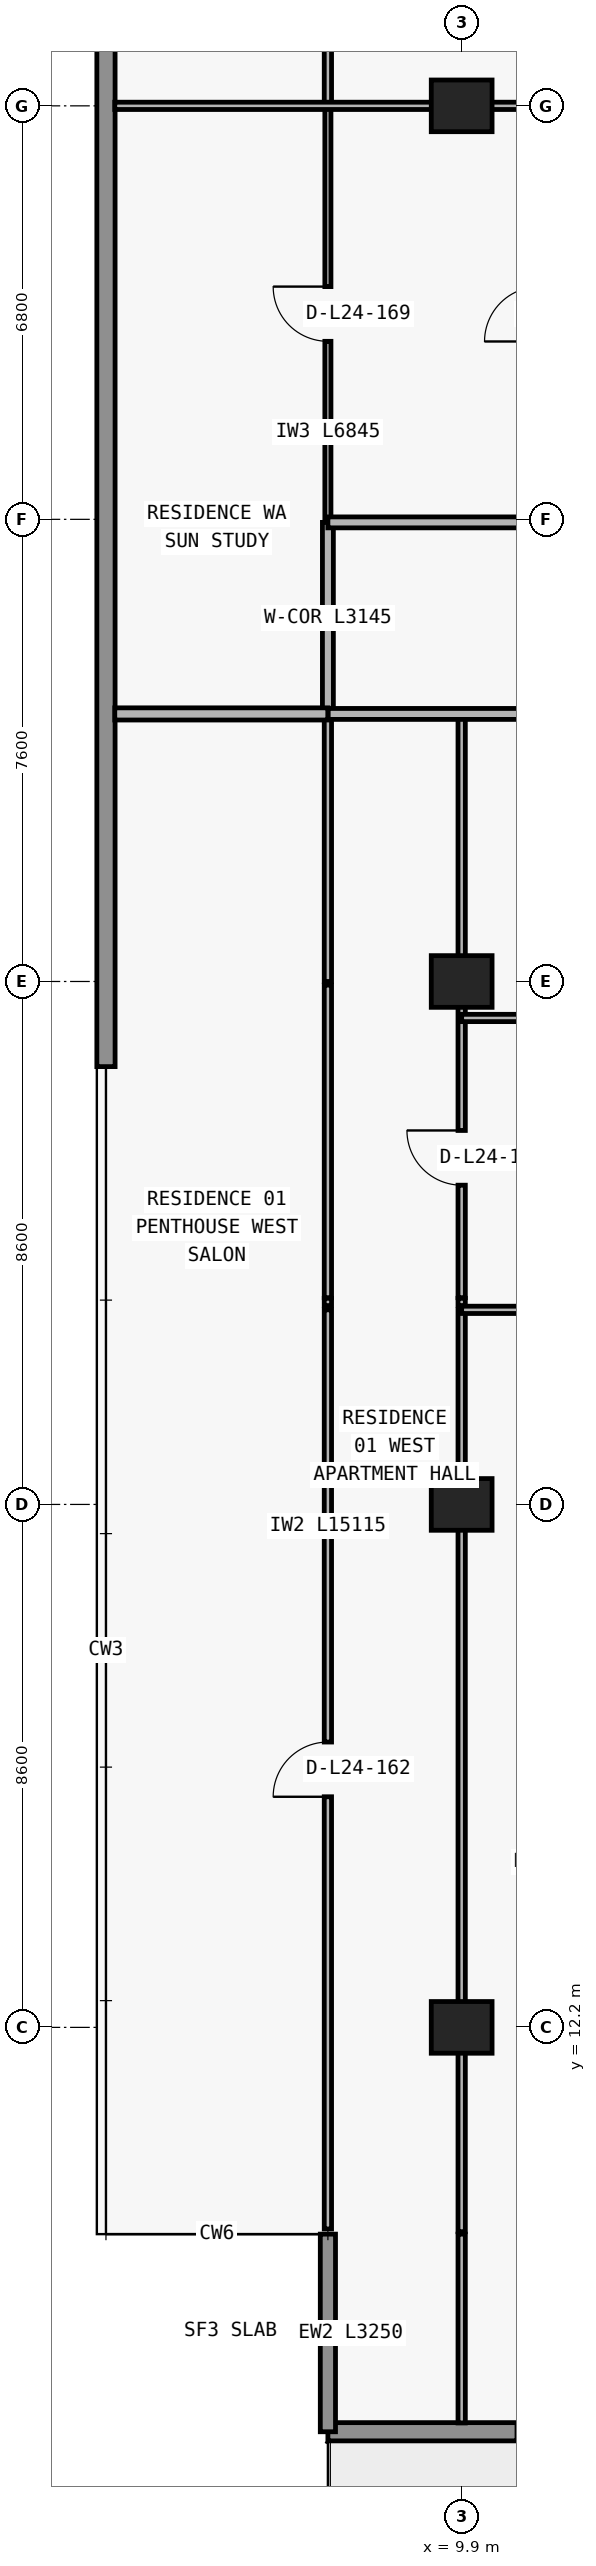
"""IFC4 building model, lengths in metres.
Left out: names, types, materials, properties, quantities, classifications, styles, units other than length and angle.
Written with IfcOpenShell. Run it as: python <this file> out.ifc"""

import sys

from ifc_helpers import new_model, si_unit, direction, frame, frame_2d, origin, origin_2d, place, context, subcontext, project, spatial, rectangle, extrude, element, fill, save


model = new_model("IFC4")
c1 = context("Model", 3, precision=1e-05, world=origin(), true_north=direction((0.0, 1.0)))
c2 = subcontext(c1, "Body", "Model", "MODEL_VIEW")
j1 = project(units=[si_unit("LENGTHUNIT", "METRE"), si_unit("PLANEANGLEUNIT", "RADIAN")], contexts=[c1])
p1 = place(None, origin())
s1 = spatial("IfcSite", under=j1, at=p1, CompositionType="ELEMENT")
p2 = place(p1, origin())
s2 = spatial("IfcBuilding", under=s1, at=p2, CompositionType="ELEMENT")
p3 = place(p2, frame((0.0, 0.0, 91.2)))
s3 = spatial("IfcBuildingStorey", under=s2, at=p3, CompositionType="ELEMENT", Elevation=91.2)
for number, where, z_axis, x_axis in (
    (1, (9.9, 12.2, 0.0), (0.0, 0.0, 1.0), (1.0, 0.0, 0.0)),
    (2, (9.9, 20.8, 0.0), (0.0, 0.0, 1.0), (1.0, 0.0, 0.0)),
    (3, (9.9, 29.4, 0.0), (0.0, 0.0, 1.0), (1.0, 0.0, 0.0)),
    (4, (9.9, 43.8, 0.0), (0.0, 0.0, 1.0), (1.0, 0.0, 0.0)),
):
    element("IfcColumn", number, at=place(p3, frame(where, z_axis=z_axis, x_axis=x_axis)), inside=s3, PredefinedType="COLUMN", context=c2, shape_type="SweptSolid", body=[
        extrude(rectangle(XDim=1.0, YDim=0.85, at=origin_2d()), origin(), (0.0, 0.0, 1.0), 3.05),
    ])
p4 = place(p3, frame((70.1, 5.55, 0.0), z_axis=(0.0, 0.0, 1.0), x_axis=(-1.0, 0.0, 0.0)))
e5 = element("IfcWall", 5, at=p4, inside=s3, PredefinedType="STANDARD", context=c2, shape_type="SweptSolid", body=[
    extrude(rectangle(XDim=62.4, YDim=0.3, at=frame_2d((31.2, 0.0))), origin(), (0.0, 0.0, 1.0), 3.05),
])
p5 = place(p4, frame((57.29, 0.0, 0.0)))
e6 = element("IfcOpeningElement", 6, at=p5, cuts=e5, PredefinedType="OPENING", context=c2, shape_type="SweptSolid", body=[
    extrude(rectangle(XDim=2.0, YDim=2.3, at=frame_2d((1.0, 1.15))), frame((0.0, 0.16, 0.0), z_axis=(0.0, -1.0, 0.0), x_axis=(1.0, 0.0, 0.0)), (0.0, 0.0, 1.0), 0.32),
])
p6 = place(p4, frame((52.61, 0.0, 0.65)))
e7 = element("IfcOpeningElement", 7, at=p6, cuts=e5, PredefinedType="OPENING", context=c2, shape_type="SweptSolid", body=[
    extrude(rectangle(XDim=2.6, YDim=1.85, at=frame_2d((1.3, 0.925))), frame((0.0, 0.16, 0.0), z_axis=(0.0, -1.0, 0.0), x_axis=(1.0, 0.0, 0.0)), (0.0, 0.0, 1.0), 0.32),
])
p7 = place(p4, frame((46.5, 0.0, 0.85)))
e8 = element("IfcOpeningElement", 8, at=p7, cuts=e5, PredefinedType="OPENING", context=c2, shape_type="SweptSolid", body=[
    extrude(rectangle(XDim=2.2, YDim=1.55, at=frame_2d((1.1, 0.775))), frame((0.0, 0.16, 0.0), z_axis=(0.0, -1.0, 0.0), x_axis=(1.0, 0.0, 0.0)), (0.0, 0.0, 1.0), 0.32),
])
p8 = place(p4, frame((40.09, 0.0, 0.0)))
e9 = element("IfcOpeningElement", 9, at=p8, cuts=e5, PredefinedType="OPENING", context=c2, shape_type="SweptSolid", body=[
    extrude(rectangle(XDim=2.0, YDim=2.3, at=frame_2d((1.0, 1.15))), frame((0.0, 0.16, 0.0), z_axis=(0.0, -1.0, 0.0), x_axis=(1.0, 0.0, 0.0)), (0.0, 0.0, 1.0), 0.32),
])
p9 = place(p4, frame((35.99, 0.0, 0.85)))
e10 = element("IfcOpeningElement", 10, at=p9, cuts=e5, PredefinedType="OPENING", context=c2, shape_type="SweptSolid", body=[
    extrude(rectangle(XDim=1.8, YDim=1.55, at=frame_2d((0.9, 0.775))), frame((0.0, 0.16, 0.0), z_axis=(0.0, -1.0, 0.0), x_axis=(1.0, 0.0, 0.0)), (0.0, 0.0, 1.0), 0.32),
])
p10 = place(p4, frame((28.314, 0.0, 0.85)))
e11 = element("IfcOpeningElement", 11, at=p10, cuts=e5, PredefinedType="OPENING", context=c2, shape_type="SweptSolid", body=[
    extrude(rectangle(XDim=2.2, YDim=1.55, at=frame_2d((1.1, 0.775))), frame((0.0, 0.16, 0.0), z_axis=(0.0, -1.0, 0.0), x_axis=(1.0, 0.0, 0.0)), (0.0, 0.0, 1.0), 0.32),
])
p11 = place(p4, frame((24.09, 0.0, 0.0)))
e12 = element("IfcOpeningElement", 12, at=p11, cuts=e5, PredefinedType="OPENING", context=c2, shape_type="SweptSolid", body=[
    extrude(rectangle(XDim=2.0, YDim=2.3, at=frame_2d((1.0, 1.15))), frame((0.0, 0.16, 0.0), z_axis=(0.0, -1.0, 0.0), x_axis=(1.0, 0.0, 0.0)), (0.0, 0.0, 1.0), 0.32),
])
p12 = place(p4, frame((19.99, 0.0, 0.85)))
e13 = element("IfcOpeningElement", 13, at=p12, cuts=e5, PredefinedType="OPENING", context=c2, shape_type="SweptSolid", body=[
    extrude(rectangle(XDim=1.8, YDim=1.55, at=frame_2d((0.9, 0.775))), frame((0.0, 0.16, 0.0), z_axis=(0.0, -1.0, 0.0), x_axis=(1.0, 0.0, 0.0)), (0.0, 0.0, 1.0), 0.32),
])
p13 = place(p4, frame((16.09, 0.0, 0.0)))
e14 = element("IfcOpeningElement", 14, at=p13, cuts=e5, PredefinedType="OPENING", context=c2, shape_type="SweptSolid", body=[
    extrude(rectangle(XDim=2.0, YDim=2.3, at=frame_2d((1.0, 1.15))), frame((0.0, 0.16, 0.0), z_axis=(0.0, -1.0, 0.0), x_axis=(1.0, 0.0, 0.0)), (0.0, 0.0, 1.0), 0.32),
])
p14 = place(p4, frame((11.41, 0.0, 0.65)))
e15 = element("IfcOpeningElement", 15, at=p14, cuts=e5, PredefinedType="OPENING", context=c2, shape_type="SweptSolid", body=[
    extrude(rectangle(XDim=2.6, YDim=1.85, at=frame_2d((1.3, 0.925))), frame((0.0, 0.16, 0.0), z_axis=(0.0, -1.0, 0.0), x_axis=(1.0, 0.0, 0.0)), (0.0, 0.0, 1.0), 0.32),
])
p15 = place(p4, frame((5.3, 0.0, 0.85)))
e16 = element("IfcOpeningElement", 16, at=p15, cuts=e5, PredefinedType="OPENING", context=c2, shape_type="SweptSolid", body=[
    extrude(rectangle(XDim=2.2, YDim=1.55, at=frame_2d((1.1, 0.775))), frame((0.0, 0.16, 0.0), z_axis=(0.0, -1.0, 0.0), x_axis=(1.0, 0.0, 0.0)), (0.0, 0.0, 1.0), 0.32),
])
p16 = place(p3, frame((7.7, 8.8, 0.0), z_axis=(0.0, 0.0, 1.0), x_axis=(0.0, -1.0, 0.0)))
e17 = element("IfcWall", 17, at=p16, inside=s3, PredefinedType="ELEMENTEDWALL", context=c2, shape_type="SweptSolid", body=[
    extrude(rectangle(XDim=3.25, YDim=0.25, at=frame_2d((1.625, 0.0))), origin(), (0.0, 0.0, 1.0), 3.05),
])
p17 = place(p3, frame((4.05, 28.0, 0.0), z_axis=(0.0, 0.0, 1.0), x_axis=(0.0, 1.0, 0.0)))
e18 = element("IfcWall", 18, at=p17, inside=s3, PredefinedType="STANDARD", context=c2, shape_type="SweptSolid", body=[
    extrude(rectangle(XDim=19.2, YDim=0.3, at=frame_2d((9.6, 0.0))), origin(), (0.0, 0.0, 1.0), 3.05),
])
p18 = place(p3, frame((7.7, 8.885, 0.0), z_axis=(0.0, 0.0, 1.0), x_axis=(0.0, 1.0, 0.0)))
e19 = element("IfcWall", 19, at=p18, inside=s3, PredefinedType="PARTITIONING", context=c2, shape_type="SweptSolid", body=[
    extrude(rectangle(XDim=15.115, YDim=0.12, at=frame_2d((7.558, 0.0))), origin(), (0.0, 0.0, 1.0), 3.05),
])
p19 = place(p18, frame((7.107, 0.0, 0.0)))
e20 = element("IfcOpeningElement", 20, at=p19, cuts=e19, PredefinedType="OPENING", context=c2, shape_type="SweptSolid", body=[
    extrude(rectangle(XDim=0.9, YDim=2.15, at=frame_2d((0.45, 1.075))), frame((0.0, 0.07, 0.0), z_axis=(0.0, -1.0, 0.0), x_axis=(1.0, 0.0, 0.0)), (0.0, 0.0, 1.0), 0.14),
])
p20 = place(p3, frame((7.7, 24.07, 0.0), z_axis=(0.0, 0.0, 1.0), x_axis=(0.0, 1.0, 0.0)))
e21 = element("IfcWall", 21, at=p20, inside=s3, PredefinedType="PARTITIONING", context=c2, shape_type="SweptSolid", body=[
    extrude(rectangle(XDim=0.12, YDim=0.12, at=frame_2d((0.06, 0.0))), origin(), (0.0, 0.0, 1.0), 3.05),
])
p21 = place(p3, frame((7.7, 24.2, 0.0), z_axis=(0.0, 0.0, 1.0), x_axis=(0.0, 1.0, 0.0)))
e22 = element("IfcWall", 22, at=p21, inside=s3, PredefinedType="PARTITIONING", context=c2, shape_type="SweptSolid", body=[
    extrude(rectangle(XDim=5.14, YDim=0.12, at=frame_2d((2.57, 0.0))), origin(), (0.0, 0.0, 1.0), 3.05),
])
p22 = place(p3, frame((7.7, 29.4, 0.0), z_axis=(0.0, 0.0, 1.0), x_axis=(0.0, 1.0, 0.0)))
e23 = element("IfcWall", 23, at=p22, inside=s3, PredefinedType="PARTITIONING", context=c2, shape_type="SweptSolid", body=[
    extrude(rectangle(XDim=4.4, YDim=0.12, at=frame_2d((2.2, 0.0))), origin(), (0.0, 0.0, 1.0), 3.05),
])
p23 = place(p3, frame((7.7, 33.805, 0.0), z_axis=(0.0, 0.0, 1.0), x_axis=(0.0, 1.0, 0.0)))
e24 = element("IfcWall", 24, at=p23, inside=s3, PredefinedType="PARTITIONING", context=c2, shape_type="SweptSolid", body=[
    extrude(rectangle(XDim=3.145, YDim=0.18, at=frame_2d((1.573, 0.0))), origin(), (0.0, 0.0, 1.0), 3.05),
])
p24 = place(p3, frame((7.7, 36.955, 0.0), z_axis=(0.0, 0.0, 1.0), x_axis=(0.0, 1.0, 0.0)))
e25 = element("IfcWall", 25, at=p24, inside=s3, PredefinedType="MOVABLE", context=c2, shape_type="SweptSolid", body=[
    extrude(rectangle(XDim=6.845, YDim=0.1, at=frame_2d((3.422, 0.0))), origin(), (0.0, 0.0, 1.0), 3.05),
])
p25 = place(p24, frame((2.972, 0.0, 0.0)))
e26 = element("IfcOpeningElement", 26, at=p25, cuts=e25, PredefinedType="OPENING", context=c2, shape_type="SweptSolid", body=[
    extrude(rectangle(XDim=0.9, YDim=2.15, at=frame_2d((0.45, 1.075))), frame((0.0, 0.06, 0.0), z_axis=(0.0, -1.0, 0.0), x_axis=(1.0, 0.0, 0.0)), (0.0, 0.0, 1.0), 0.12),
])
p26 = place(p3, frame((7.7, 43.805, 0.0), z_axis=(0.0, 0.0, 1.0), x_axis=(0.0, 1.0, 0.0)))
e27 = element("IfcWall", 27, at=p26, inside=s3, PredefinedType="PARTITIONING", context=c2, shape_type="SweptSolid", body=[
    extrude(rectangle(XDim=3.275, YDim=0.12, at=frame_2d((1.638, 0.0))), origin(), (0.0, 0.0, 1.0), 3.05),
])
p27 = place(p26, frame((1.188, 0.0, 0.0)))
e28 = element("IfcOpeningElement", 28, at=p27, cuts=e27, PredefinedType="OPENING", context=c2, shape_type="SweptSolid", body=[
    extrude(rectangle(XDim=0.9, YDim=2.15, at=frame_2d((0.45, 1.075))), frame((0.0, 0.07, 0.0), z_axis=(0.0, -1.0, 0.0), x_axis=(1.0, 0.0, 0.0)), (0.0, 0.0, 1.0), 0.14),
])
p28 = place(p3, frame((9.9, 5.695, 0.0), z_axis=(0.0, 0.0, 1.0), x_axis=(0.0, 1.0, 0.0)))
e29 = element("IfcWall", 29, at=p28, inside=s3, PredefinedType="PARTITIONING", context=c2, shape_type="SweptSolid", body=[
    extrude(rectangle(XDim=3.105, YDim=0.12, at=frame_2d((1.552, 0.0))), origin(), (0.0, 0.0, 1.0), 3.05),
])
p29 = place(p3, frame((9.9, 8.84, 0.0), z_axis=(0.0, 0.0, 1.0), x_axis=(0.0, 1.0, 0.0)))
e30 = element("IfcWall", 30, at=p29, inside=s3, PredefinedType="PARTITIONING", context=c2, shape_type="SweptSolid", body=[
    extrude(rectangle(XDim=15.16, YDim=0.12, at=frame_2d((7.58, 0.0))), origin(), (0.0, 0.0, 1.0), 2.174),
])
p30 = place(p3, frame((9.9, 24.07, 0.0), z_axis=(0.0, 0.0, 1.0), x_axis=(0.0, 1.0, 0.0)))
e31 = element("IfcWall", 31, at=p30, inside=s3, PredefinedType="PARTITIONING", context=c2, shape_type="SweptSolid", body=[
    extrude(rectangle(XDim=0.12, YDim=0.12, at=frame_2d((0.06, 0.0))), origin(), (0.0, 0.0, 1.0), 2.174),
])
p31 = place(p3, frame((9.9, 24.2, 0.0), z_axis=(0.0, 0.0, 1.0), x_axis=(0.0, 1.0, 0.0)))
e32 = element("IfcWall", 32, at=p31, inside=s3, PredefinedType="PARTITIONING", context=c2, shape_type="SweptSolid", body=[
    extrude(rectangle(XDim=5.14, YDim=0.12, at=frame_2d((2.57, 0.0))), origin(), (0.0, 0.0, 1.0), 2.174),
])
p32 = place(p31, frame((1.85, 0.0, 0.0)))
e33 = element("IfcOpeningElement", 33, at=p32, cuts=e32, PredefinedType="OPENING", context=c2, shape_type="SweptSolid", body=[
    extrude(rectangle(XDim=0.9, YDim=2.124, at=frame_2d((0.45, 1.062))), frame((0.0, 0.07, 0.0), z_axis=(0.0, -1.0, 0.0), x_axis=(1.0, 0.0, 0.0)), (0.0, 0.0, 1.0), 0.14),
])
p33 = place(p3, frame((9.9, 29.4, 0.0), z_axis=(0.0, 0.0, 1.0), x_axis=(0.0, 1.0, 0.0)))
e34 = element("IfcWall", 34, at=p33, inside=s3, PredefinedType="PARTITIONING", context=c2, shape_type="SweptSolid", body=[
    extrude(rectangle(XDim=4.4, YDim=0.12, at=frame_2d((2.2, 0.0))), origin(), (0.0, 0.0, 1.0), 2.174),
])
p34 = place(p3, frame((9.9, 24.0, 0.0), z_axis=(0.0, 0.0, 1.0), x_axis=(1.0, 0.0, 0.0)))
e35 = element("IfcWall", 35, at=p34, inside=s3, PredefinedType="PARTITIONING", context=c2, shape_type="SweptSolid", body=[
    extrude(rectangle(XDim=8.35, YDim=0.12, at=frame_2d((4.175, 0.0))), origin(), (0.0, 0.0, 1.0), 3.05),
])
p35 = place(p34, frame((1.44, 0.0, 0.0)))
e36 = element("IfcOpeningElement", 36, at=p35, cuts=e35, PredefinedType="OPENING", context=c2, shape_type="SweptSolid", body=[
    extrude(rectangle(XDim=0.9, YDim=2.15, at=frame_2d((0.45, 1.075))), frame((0.0, 0.07, 0.0), z_axis=(0.0, -1.0, 0.0), x_axis=(1.0, 0.0, 0.0)), (0.0, 0.0, 1.0), 0.14),
])
p36 = place(p3, frame((9.9, 28.8, 0.0), z_axis=(0.0, 0.0, 1.0), x_axis=(1.0, 0.0, 0.0)))
e37 = element("IfcWall", 37, at=p36, inside=s3, PredefinedType="PARTITIONING", context=c2, shape_type="SweptSolid", body=[
    extrude(rectangle(XDim=8.35, YDim=0.12, at=frame_2d((4.175, 0.0))), origin(), (0.0, 0.0, 1.0), 3.05),
])
p37 = place(p36, frame((1.44, 0.0, 0.0)))
e38 = element("IfcOpeningElement", 38, at=p37, cuts=e37, PredefinedType="OPENING", context=c2, shape_type="SweptSolid", body=[
    extrude(rectangle(XDim=0.9, YDim=2.15, at=frame_2d((0.45, 1.075))), frame((0.0, 0.07, 0.0), z_axis=(0.0, -1.0, 0.0), x_axis=(1.0, 0.0, 0.0)), (0.0, 0.0, 1.0), 0.14),
])
p38 = place(p3, frame((4.195, 33.8, 0.0), z_axis=(0.0, 0.0, 1.0), x_axis=(1.0, 0.0, 0.0)))
e39 = element("IfcWall", 39, at=p38, inside=s3, PredefinedType="PARTITIONING", context=c2, shape_type="SweptSolid", body=[
    extrude(rectangle(XDim=3.505, YDim=0.2, at=frame_2d((1.752, 0.0))), origin(), (0.0, 0.0, 1.0), 3.05),
])
p39 = place(p3, frame((7.705, 33.8, 0.0), z_axis=(0.0, 0.0, 1.0), x_axis=(1.0, 0.0, 0.0)))
e40 = element("IfcWall", 40, at=p39, inside=s3, PredefinedType="PARTITIONING", context=c2, shape_type="SweptSolid", body=[
    extrude(rectangle(XDim=10.545, YDim=0.18, at=frame_2d((5.272, 0.0))), origin(), (0.0, 0.0, 1.0), 3.05),
])
p40 = place(p39, frame((4.865, 0.0, 0.0)))
e41 = element("IfcOpeningElement", 41, at=p40, cuts=e40, PredefinedType="OPENING", context=c2, shape_type="SweptSolid", body=[
    extrude(rectangle(XDim=1.0, YDim=2.2, at=frame_2d((0.5, 1.1))), frame((0.0, 0.1, 0.0), z_axis=(0.0, -1.0, 0.0), x_axis=(1.0, 0.0, 0.0)), (0.0, 0.0, 1.0), 0.2),
])
p41 = place(p3, frame((7.7, 36.95, 0.0), z_axis=(0.0, 0.0, 1.0), x_axis=(1.0, 0.0, 0.0)))
e42 = element("IfcWall", 42, at=p41, inside=s3, PredefinedType="PARTITIONING", context=c2, shape_type="SweptSolid", body=[
    extrude(rectangle(XDim=10.145, YDim=0.18, at=frame_2d((5.073, 0.0))), origin(), (0.0, 0.0, 1.0), 3.05),
])
p42 = place(p41, frame((5.188, 0.0, 0.0)))
e43 = element("IfcOpeningElement", 43, at=p42, cuts=e42, PredefinedType="OPENING", context=c2, shape_type="SweptSolid", body=[
    extrude(rectangle(XDim=1.0, YDim=2.2, at=frame_2d((0.5, 1.1))), frame((0.0, 0.1, 0.0), z_axis=(0.0, -1.0, 0.0), x_axis=(1.0, 0.0, 0.0)), (0.0, 0.0, 1.0), 0.2),
])
p43 = place(p3, frame((4.195, 43.8, 0.0), z_axis=(0.0, 0.0, 1.0), x_axis=(1.0, 0.0, 0.0)))
e44 = element("IfcWall", 44, at=p43, inside=s3, PredefinedType="PARTITIONING", context=c2, shape_type="SweptSolid", body=[
    extrude(rectangle(XDim=13.66, YDim=0.12, at=frame_2d((6.83, 0.0))), origin(), (0.0, 0.0, 1.0), 2.339),
])
p44 = place(p43, frame((8.743, 0.0, 0.0)))
e45 = element("IfcOpeningElement", 45, at=p44, cuts=e44, PredefinedType="OPENING", context=c2, shape_type="SweptSolid", body=[
    extrude(rectangle(XDim=0.9, YDim=2.15, at=frame_2d((0.45, 1.075))), frame((0.0, 0.07, 0.0), z_axis=(0.0, -1.0, 0.0), x_axis=(1.0, 0.0, 0.0)), (0.0, 0.0, 1.0), 0.14),
])
p45 = place(p43, frame((12.107, 0.0, 0.0)))
e46 = element("IfcOpeningElement", 46, at=p45, cuts=e44, PredefinedType="OPENING", context=c2, shape_type="SweptSolid", body=[
    extrude(rectangle(XDim=0.85, YDim=2.1, at=frame_2d((0.425, 1.05))), frame((0.0, 0.07, 0.0), z_axis=(0.0, -1.0, 0.0), x_axis=(1.0, 0.0, 0.0)), (0.0, 0.0, 1.0), 0.14),
])
p46 = place(p32, origin())
e47 = element("IfcDoor", 47, at=p46, inside=s3, OperationType="SINGLE_SWING_RIGHT", PredefinedType="DOOR", context=c2, shape_type="SweptSolid", body=[
    extrude(rectangle(XDim=0.9, YDim=2.124, at=frame_2d((0.45, 1.062))), frame((0.0, 0.025, 0.0), z_axis=(0.0, -1.0, 0.0), x_axis=(1.0, 0.0, 0.0)), (0.0, 0.0, 1.0), 0.05),
])
fill(e33, e47)
p47 = place(p19, origin())
e48 = element("IfcDoor", 48, at=p47, inside=s3, OperationType="SINGLE_SWING_LEFT", PredefinedType="DOOR", context=c2, shape_type="SweptSolid", body=[
    extrude(rectangle(XDim=0.9, YDim=2.15, at=frame_2d((0.45, 1.075))), frame((0.0, 0.025, 0.0), z_axis=(0.0, -1.0, 0.0), x_axis=(1.0, 0.0, 0.0)), (0.0, 0.0, 1.0), 0.05),
])
fill(e20, e48)
p48 = place(p25, origin())
e49 = element("IfcDoor", 49, at=p48, inside=s3, OperationType="SINGLE_SWING_RIGHT", PredefinedType="DOOR", context=c2, shape_type="SweptSolid", body=[
    extrude(rectangle(XDim=0.9, YDim=2.15, at=frame_2d((0.45, 1.075))), frame((0.0, 0.025, 0.0), z_axis=(0.0, -1.0, 0.0), x_axis=(1.0, 0.0, 0.0)), (0.0, 0.0, 1.0), 0.05),
])
fill(e26, e49)
save(model, sys.argv[1])
